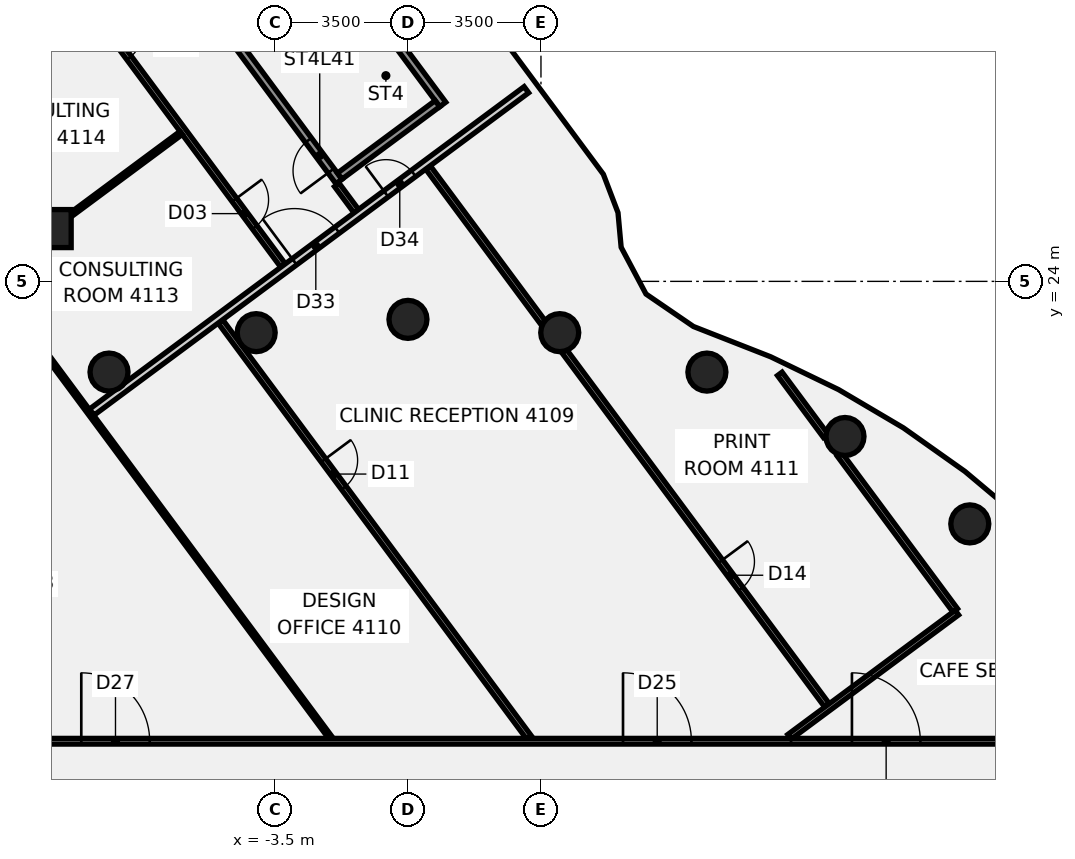
"""IFC4 building model, lengths in metres.
Left out: names, types, materials, properties, quantities, classifications, styles, units other than length and angle.
Written with IfcOpenShell. Run it as: python <this file> out.ifc"""

import sys

from ifc_helpers import new_model, si_unit, direction, frame, frame_2d, origin, origin_2d, place, context, subcontext, project, spatial, rectangle, circle, extrude, element, fill, save


model = new_model("IFC4")
c1 = context("Model", 3, precision=1e-05, world=origin(), true_north=direction((0.0, 1.0)))
c2 = subcontext(c1, "Body", "Model", "MODEL_VIEW")
j1 = project(units=[si_unit("LENGTHUNIT", "METRE"), si_unit("PLANEANGLEUNIT", "RADIAN")], contexts=[c1])
p1 = place(None, origin())
s1 = spatial("IfcSite", under=j1, at=p1, CompositionType="ELEMENT")
p2 = place(p1, origin())
s2 = spatial("IfcBuilding", under=s1, at=p2, CompositionType="ELEMENT")
p3 = place(p2, frame((0.0, 0.0, 166.75)))
s3 = spatial("IfcBuildingStorey", under=s2, at=p3, CompositionType="ELEMENT", Elevation=166.75)
for number, where, z_axis, x_axis in (
    (1, (14.784, 17.619, -0.14), (0.0, 0.0, 1.0), (1.0, 0.0, 0.0)),
    (2, (11.5, 19.919, -0.14), (0.0, 0.0, 1.0), (1.0, 0.0, 0.0)),
    (3, (7.866, 21.613, -0.14), (0.0, 0.0, 1.0), (1.0, 0.0, 0.0)),
    (4, (3.994, 22.651, -0.14), (0.0, 0.0, 1.0), (1.0, 0.0, 0.0)),
    (5, (0.0, 23.0, -0.14), (0.0, 0.0, 1.0), (1.0, 0.0, 0.0)),
    (6, (-3.994, 22.651, -0.14), (0.0, 0.0, 1.0), (1.0, 0.0, 0.0)),
    (7, (-7.866, 21.613, -0.14), (0.0, 0.0, 1.0), (1.0, 0.0, 0.0)),
):
    element("IfcColumn", number, at=place(p3, frame(where, z_axis=z_axis, x_axis=x_axis)), inside=s3, PredefinedType="COLUMN", context=c2, shape_type="SweptSolid", body=[
        extrude(circle(Radius=0.5, at=origin_2d()), origin(), (0.0, 0.0, 1.0), 3.75),
    ])
p4 = place(p3, frame((-9.362, 25.389, -0.139), z_axis=(-0.016073420315, -0.045617277899, 0.998829669722), x_axis=(0.803150042822, 0.594427631034, 0.040072436636)))
e8 = element("IfcColumn", 8, at=p4, inside=s3, PredefinedType="COLUMN", context=c2, shape_type="SweptSolid", body=[
    extrude(rectangle(XDim=1.0, YDim=1.0, at=origin_2d()), origin(), (0.0, 0.0, 1.0), 3.752),
])
p5 = place(p3, frame((-13.904, 38.73, 0.0), z_axis=(0.0, 0.0, 1.0), x_axis=(0.59579618611, -0.803135670119, 0.0)))
e9 = element("IfcWall", 9, at=p5, inside=s3, PredefinedType="PARTITIONING", context=c2, shape_type="SweptSolid", body=[
    extrude(rectangle(XDim=17.82, YDim=0.15, at=frame_2d((8.91, 0.0))), origin(), (0.0, 0.0, 1.0), 3.01),
])
p6 = place(p5, frame((15.67, 0.0, 0.0)))
e10 = element("IfcOpeningElement", 10, at=p6, cuts=e9, PredefinedType="OPENING", context=c2, shape_type="SweptSolid", body=[
    extrude(rectangle(XDim=0.9, YDim=2.1, at=frame_2d((0.45, 1.05))), frame((0.0, 0.085, 0.0), z_axis=(0.0, -1.0, 0.0), x_axis=(1.0, 0.0, 0.0)), (0.0, 0.0, 1.0), 0.17),
])
p7 = place(p5, frame((10.121, 0.0, 0.0)))
e11 = element("IfcOpeningElement", 11, at=p7, cuts=e9, PredefinedType="OPENING", context=c2, shape_type="SweptSolid", body=[
    extrude(rectangle(XDim=0.9, YDim=2.1, at=frame_2d((0.45, 1.05))), frame((0.0, 0.085, 0.0), z_axis=(0.0, -1.0, 0.0), x_axis=(1.0, 0.0, 0.0)), (0.0, 0.0, 1.0), 0.17),
])
p8 = place(p5, frame((6.82, 0.0, 0.0)))
e12 = element("IfcOpeningElement", 12, at=p8, cuts=e9, PredefinedType="OPENING", context=c2, shape_type="SweptSolid", body=[
    extrude(rectangle(XDim=0.9, YDim=2.1, at=frame_2d((0.45, 1.05))), frame((0.0, 0.085, 0.0), z_axis=(0.0, -1.0, 0.0), x_axis=(1.0, 0.0, 0.0)), (0.0, 0.0, 1.0), 0.17),
])
p9 = place(p5, frame((2.32, 0.0, 0.0)))
e13 = element("IfcOpeningElement", 13, at=p9, cuts=e9, PredefinedType="OPENING", context=c2, shape_type="SweptSolid", body=[
    extrude(rectangle(XDim=0.9, YDim=2.1, at=frame_2d((0.45, 1.05))), frame((0.0, 0.085, 0.0), z_axis=(0.0, -1.0, 0.0), x_axis=(1.0, 0.0, 0.0)), (0.0, 0.0, 1.0), 0.17),
])
p10 = place(p3, frame((-1.872, 26.538, 0.0), z_axis=(0.0, 0.0, 1.0), x_axis=(0.595675602575, -0.803225109478, 0.0)))
e14 = element("IfcWall", 14, at=p10, inside=s3, PredefinedType="PARTITIONING", context=c2, shape_type="SweptSolid", body=[
    extrude(rectangle(XDim=0.86, YDim=0.15, at=frame_2d((0.43, 0.0))), origin(), (0.0, 0.0, 1.0), 3.01),
])
p11 = place(p3, frame((-10.28, 23.102, 0.0), z_axis=(0.0, 0.0, 1.0), x_axis=(0.595748539786, -0.803171013759, 0.0)))
e15 = element("IfcWall", 15, at=p11, inside=s3, PredefinedType="PARTITIONING", context=c2, shape_type="SweptSolid", body=[
    extrude(rectangle(XDim=13.837, YDim=0.1, at=frame_2d((6.918, 0.0))), origin(), (0.0, 0.0, 1.0), 3.01),
])
p12 = place(p3, frame((-4.935, 22.946, 0.0), z_axis=(0.0, 0.0, 1.0), x_axis=(0.595807043393, -0.803127615665, 0.0)))
e16 = element("IfcWall", 16, at=p12, inside=s3, PredefinedType="PARTITIONING", context=c2, shape_type="SweptSolid", body=[
    extrude(rectangle(XDim=13.628, YDim=0.15, at=frame_2d((6.814, 0.0))), origin(), (0.0, 0.0, 1.0), 3.01),
])
p13 = place(p12, frame((4.55, 0.0, 0.0)))
e17 = element("IfcOpeningElement", 17, at=p13, cuts=e16, PredefinedType="OPENING", context=c2, shape_type="SweptSolid", body=[
    extrude(rectangle(XDim=0.9, YDim=2.1, at=frame_2d((0.45, 1.05))), frame((0.0, 0.085, 0.0), z_axis=(0.0, -1.0, 0.0), x_axis=(1.0, 0.0, 0.0)), (0.0, 0.0, 1.0), 0.17),
])
p14 = place(p3, frame((0.527, 26.998, 0.0), z_axis=(0.0, 0.0, 1.0), x_axis=(0.595769052074, -0.803155798455, 0.0)))
e18 = element("IfcWall", 18, at=p14, inside=s3, PredefinedType="PARTITIONING", context=c2, shape_type="SweptSolid", body=[
    extrude(rectangle(XDim=5.088, YDim=0.15, at=frame_2d((2.544, 0.0))), origin(), (0.0, 0.0, 1.0), 3.01),
])
p15 = place(p3, frame((4.107, 22.171, 0.0), z_axis=(0.0, 0.0, 1.0), x_axis=(0.59578611064, -0.803143144382, 0.0)))
e19 = element("IfcWall", 19, at=p15, inside=s3, PredefinedType="PARTITIONING", context=c2, shape_type="SweptSolid", body=[
    extrude(rectangle(XDim=11.61, YDim=0.15, at=frame_2d((5.805, 0.0))), origin(), (0.0, 0.0, 1.0), 3.01),
])
p16 = place(p15, frame((6.9, 0.0, 0.0)))
e20 = element("IfcOpeningElement", 20, at=p16, cuts=e19, PredefinedType="OPENING", context=c2, shape_type="SweptSolid", body=[
    extrude(rectangle(XDim=0.9, YDim=2.1, at=frame_2d((0.45, 1.05))), frame((0.0, 0.085, 0.0), z_axis=(0.0, -1.0, 0.0), x_axis=(1.0, 0.0, 0.0)), (0.0, 0.0, 1.0), 0.17),
])
p17 = place(p3, frame((9.784, 21.566, 0.0), z_axis=(0.0, 0.0, 1.0), x_axis=(0.595779392593, -0.803148127908, 0.0)))
e21 = element("IfcWall", 21, at=p17, inside=s3, PredefinedType="PARTITIONING", context=c2, shape_type="SweptSolid", body=[
    extrude(rectangle(XDim=2.031, YDim=0.15, at=frame_2d((1.016, 0.0))), origin(), (0.0, 0.0, 1.0), 3.01),
])
p18 = place(p3, frame((11.357, 19.447, 0.0), z_axis=(0.0, 0.0, 1.0), x_axis=(0.595809139837, -0.803126060396, 0.0)))
e22 = element("IfcWall", 22, at=p18, inside=s3, PredefinedType="PARTITIONING", context=c2, shape_type="SweptSolid", body=[
    extrude(rectangle(XDim=5.108, YDim=0.15, at=frame_2d((2.554, 0.0))), origin(), (0.0, 0.0, 1.0), 3.01),
])
p19 = place(p3, frame((-17.065, 11.9, 0.0), z_axis=(0.0, 0.0, 1.0), x_axis=(1.0, 0.0, 0.0)))
e23 = element("IfcWall", 23, at=p19, inside=s3, PredefinedType="PARTITIONING", context=c2, shape_type="SweptSolid", body=[
    extrude(rectangle(XDim=34.165, YDim=0.15, at=frame_2d((17.083, 0.0))), origin(), (0.0, 0.0, 1.0), 3.01),
])
p20 = place(p19, frame((22.724, 0.0, 0.0)))
e24 = element("IfcOpeningElement", 24, at=p20, cuts=e23, PredefinedType="OPENING", context=c2, shape_type="SweptSolid", body=[
    extrude(rectangle(XDim=1.8, YDim=2.1, at=frame_2d((0.9, 1.05))), frame((0.0, 0.085, 0.0), z_axis=(0.0, -1.0, 0.0), x_axis=(1.0, 0.0, 0.0)), (0.0, 0.0, 1.0), 0.17),
])
p21 = place(p19, frame((28.748, 0.0, 0.0)))
e25 = element("IfcOpeningElement", 25, at=p21, cuts=e23, PredefinedType="OPENING", context=c2, shape_type="SweptSolid", body=[
    extrude(rectangle(XDim=1.8, YDim=2.1, at=frame_2d((0.9, 1.05))), frame((0.0, 0.085, 0.0), z_axis=(0.0, -1.0, 0.0), x_axis=(1.0, 0.0, 0.0)), (0.0, 0.0, 1.0), 0.17),
])
p22 = place(p19, frame((8.469, 0.0, 0.0)))
e26 = element("IfcOpeningElement", 26, at=p22, cuts=e23, PredefinedType="OPENING", context=c2, shape_type="SweptSolid", body=[
    extrude(rectangle(XDim=1.8, YDim=2.1, at=frame_2d((0.9, 1.05))), frame((0.0, 0.085, 0.0), z_axis=(0.0, -1.0, 0.0), x_axis=(1.0, 0.0, 0.0)), (0.0, 0.0, 1.0), 0.17),
])
p23 = place(p3, frame((-13.029, 28.271, 0.0), z_axis=(0.0, 0.0, 1.0), x_axis=(0.803121526748, 0.595815250958, 0.0)))
e27 = element("IfcWall", 27, at=p23, inside=s3, PredefinedType="PARTITIONING", context=c2, shape_type="SweptSolid", body=[
    extrude(rectangle(XDim=5.453, YDim=0.1, at=frame_2d((2.726, 0.0))), origin(), (0.0, 0.0, 1.0), 3.01),
])
p24 = place(p3, frame((-8.95, 25.695, 0.0), z_axis=(0.0, 0.0, 1.0), x_axis=(0.803185337767, 0.595729228086, 0.0)))
e28 = element("IfcWall", 28, at=p24, inside=s3, PredefinedType="PARTITIONING", context=c2, shape_type="SweptSolid", body=[
    extrude(rectangle(XDim=3.712, YDim=0.1, at=frame_2d((1.856, 0.0))), origin(), (0.0, 0.0, 1.0), 3.01),
])
p25 = place(p3, frame((-8.32, 20.56, 0.0), z_axis=(0.0, 0.0, 1.0), x_axis=(0.803159426549, 0.595764161012, 0.0)))
e29 = element("IfcWall", 29, at=p25, inside=s3, PredefinedType="PARTITIONING", context=c2, shape_type="SweptSolid", body=[
    extrude(rectangle(XDim=14.239, YDim=0.2, at=frame_2d((7.12, 0.0))), origin(), (0.0, 0.0, 1.0), 3.01),
])
p26 = place(p25, frame((6.64, 0.0, 0.0)))
e30 = element("IfcOpeningElement", 30, at=p26, cuts=e29, PredefinedType="OPENING", context=c2, shape_type="SweptSolid", body=[
    extrude(rectangle(XDim=1.4, YDim=2.1, at=frame_2d((0.7, 1.05))), frame((0.0, 0.11, 0.0), z_axis=(0.0, -1.0, 0.0), x_axis=(1.0, 0.0, 0.0)), (0.0, 0.0, 1.0), 0.22),
])
p27 = place(p25, frame((9.64, 0.0, 0.0)))
e31 = element("IfcOpeningElement", 31, at=p27, cuts=e29, PredefinedType="OPENING", context=c2, shape_type="SweptSolid", body=[
    extrude(rectangle(XDim=0.9, YDim=2.1, at=frame_2d((0.45, 1.05))), frame((0.0, 0.11, 0.0), z_axis=(0.0, -1.0, 0.0), x_axis=(1.0, 0.0, 0.0)), (0.0, 0.0, 1.0), 0.22),
])
p28 = place(p3, frame((10.04, 12.016, 0.0), z_axis=(0.0, 0.0, 1.0), x_axis=(0.803166728219, 0.595754317385, 0.0)))
e32 = element("IfcWall", 32, at=p28, inside=s3, PredefinedType="PARTITIONING", context=c2, shape_type="SweptSolid", body=[
    extrude(rectangle(XDim=5.485, YDim=0.15, at=frame_2d((2.743, 0.0))), origin(), (0.0, 0.0, 1.0), 3.01),
])
p29 = place(p3, frame((-1.816, 26.63, -0.14), z_axis=(0.0, 0.0, 1.0), x_axis=(-0.595776416227, 0.803150335783, 0.0)))
e33 = element("IfcWall", 33, at=p29, inside=s3, PredefinedType="SHEAR", context=c2, shape_type="SweptSolid", body=[
    extrude(rectangle(XDim=6.7, YDim=0.2, at=frame_2d((3.35, 0.0))), origin(), (0.0, 0.0, 1.0), 3.15),
])
p30 = place(p29, frame((0.35, 0.0, 0.0)))
e34 = element("IfcOpeningElement", 34, at=p30, cuts=e33, PredefinedType="OPENING", context=c2, shape_type="SweptSolid", body=[
    extrude(rectangle(XDim=1.0, YDim=2.1, at=frame_2d((0.5, 1.05))), frame((0.0, 0.11, 0.0), z_axis=(0.0, -1.0, 0.0), x_axis=(1.0, 0.0, 0.0)), (0.0, 0.0, 1.0), 0.22),
])
p31 = place(p3, frame((0.915, 28.655, -0.14), z_axis=(0.0, 0.0, 1.0), x_axis=(-0.595776416227, 0.803150335783, 0.0)))
e35 = element("IfcWall", 35, at=p31, inside=s3, PredefinedType="SHEAR", context=c2, shape_type="SweptSolid", body=[
    extrude(rectangle(XDim=6.7, YDim=0.2, at=frame_2d((3.35, 0.0))), origin(), (0.0, 0.0, 1.0), 3.15),
])
p32 = place(p3, frame((0.775, 28.676, -0.14), z_axis=(0.0, 0.0, 1.0), x_axis=(-0.80314748859, -0.595780254432, 0.0)))
e36 = element("IfcWall", 36, at=p32, inside=s3, PredefinedType="SHEAR", context=c2, shape_type="SweptSolid", body=[
    extrude(rectangle(XDim=3.2, YDim=0.2, at=frame_2d((1.6, 0.0))), origin(), (0.0, 0.0, 1.0), 3.15),
])
p33 = place(p6, frame((0.9, 0.0, 0.0), z_axis=(0.0, 0.0, 1.0), x_axis=(-1.0, 0.0, 0.0)))
e37 = element("IfcDoor", 37, at=p33, inside=s3, OperationType="SINGLE_SWING_RIGHT", PredefinedType="DOOR", context=c2, shape_type="SweptSolid", body=[
    extrude(rectangle(XDim=0.9, YDim=2.1, at=frame_2d((0.45, 1.05))), frame((0.0, 0.025, 0.0), z_axis=(0.0, -1.0, 0.0), x_axis=(1.0, 0.0, 0.0)), (0.0, 0.0, 1.0), 0.05),
])
fill(e10, e37)
p34 = place(p7, frame((0.9, 0.0, 0.0), z_axis=(0.0, 0.0, 1.0), x_axis=(-1.0, 0.0, 0.0)))
e38 = element("IfcDoor", 38, at=p34, inside=s3, OperationType="SINGLE_SWING_RIGHT", PredefinedType="DOOR", context=c2, shape_type="SweptSolid", body=[
    extrude(rectangle(XDim=0.9, YDim=2.1, at=frame_2d((0.45, 1.05))), frame((0.0, 0.025, 0.0), z_axis=(0.0, -1.0, 0.0), x_axis=(1.0, 0.0, 0.0)), (0.0, 0.0, 1.0), 0.05),
])
fill(e11, e38)
p35 = place(p13, frame((0.9, 0.0, 0.0), z_axis=(0.0, 0.0, 1.0), x_axis=(-1.0, 0.0, 0.0)))
e39 = element("IfcDoor", 39, at=p35, inside=s3, OperationType="SINGLE_SWING_LEFT", PredefinedType="DOOR", context=c2, shape_type="SweptSolid", body=[
    extrude(rectangle(XDim=0.9, YDim=2.1, at=frame_2d((0.45, 1.05))), frame((0.0, 0.025, 0.0), z_axis=(0.0, -1.0, 0.0), x_axis=(1.0, 0.0, 0.0)), (0.0, 0.0, 1.0), 0.05),
])
fill(e17, e39)
p36 = place(p16, origin())
e40 = element("IfcDoor", 40, at=p36, inside=s3, OperationType="SINGLE_SWING_LEFT", PredefinedType="DOOR", context=c2, shape_type="SweptSolid", body=[
    extrude(rectangle(XDim=0.9, YDim=2.1, at=frame_2d((0.45, 1.05))), frame((0.0, 0.025, 0.0), z_axis=(0.0, -1.0, 0.0), x_axis=(1.0, 0.0, 0.0)), (0.0, 0.0, 1.0), 0.05),
])
fill(e20, e40)
p37 = place(p20, frame((1.8, 0.0, 0.0), z_axis=(0.0, 0.0, 1.0), x_axis=(-1.0, 0.0, 0.0)))
e41 = element("IfcDoor", 41, at=p37, inside=s3, OperationType="DOUBLE_DOOR_SINGLE_SWING", PredefinedType="DOOR", context=c2, shape_type="SweptSolid", body=[
    extrude(rectangle(XDim=1.8, YDim=2.1, at=frame_2d((0.9, 1.05))), frame((0.0, 0.025, 0.0), z_axis=(0.0, -1.0, 0.0), x_axis=(1.0, 0.0, 0.0)), (0.0, 0.0, 1.0), 0.05),
])
fill(e24, e41)
p38 = place(p21, origin())
e42 = element("IfcDoor", 42, at=p38, inside=s3, OperationType="DOUBLE_DOOR_SINGLE_SWING", PredefinedType="DOOR", context=c2, shape_type="SweptSolid", body=[
    extrude(rectangle(XDim=1.8, YDim=2.1, at=frame_2d((0.9, 1.05))), frame((0.0, 0.025, 0.0), z_axis=(0.0, -1.0, 0.0), x_axis=(1.0, 0.0, 0.0)), (0.0, 0.0, 1.0), 0.05),
])
fill(e25, e42)
p39 = place(p22, origin())
e43 = element("IfcDoor", 43, at=p39, inside=s3, OperationType="DOUBLE_DOOR_SINGLE_SWING", PredefinedType="DOOR", context=c2, shape_type="SweptSolid", body=[
    extrude(rectangle(XDim=1.8, YDim=2.1, at=frame_2d((0.9, 1.05))), frame((0.0, 0.025, 0.0), z_axis=(0.0, -1.0, 0.0), x_axis=(1.0, 0.0, 0.0)), (0.0, 0.0, 1.0), 0.05),
])
fill(e26, e43)
p40 = place(p26, frame((1.4, 0.0, 0.0), z_axis=(0.0, 0.0, 1.0), x_axis=(-1.0, 0.0, 0.0)))
e44 = element("IfcDoor", 44, at=p40, inside=s3, OperationType="DOUBLE_DOOR_SINGLE_SWING", PredefinedType="DOOR", context=c2, shape_type="SweptSolid", body=[
    extrude(rectangle(XDim=1.4, YDim=2.1, at=frame_2d((0.7, 1.05))), frame((0.0, 0.025, 0.0), z_axis=(0.0, -1.0, 0.0), x_axis=(1.0, 0.0, 0.0)), (0.0, 0.0, 1.0), 0.05),
])
fill(e30, e44)
p41 = place(p27, origin())
e45 = element("IfcDoor", 45, at=p41, inside=s3, OperationType="SINGLE_SWING_LEFT", PredefinedType="DOOR", context=c2, shape_type="SweptSolid", body=[
    extrude(rectangle(XDim=0.9, YDim=2.1, at=frame_2d((0.45, 1.05))), frame((0.0, 0.025, 0.0), z_axis=(0.0, -1.0, 0.0), x_axis=(1.0, 0.0, 0.0)), (0.0, 0.0, 1.0), 0.05),
])
fill(e31, e45)
p42 = place(p30, origin())
e46 = element("IfcDoor", 46, at=p42, inside=s3, OperationType="SINGLE_SWING_LEFT", PredefinedType="DOOR", context=c2, shape_type="SweptSolid", body=[
    extrude(rectangle(XDim=1.0, YDim=2.1, at=frame_2d((0.5, 1.05))), frame((0.0, 0.025, 0.0), z_axis=(0.0, -1.0, 0.0), x_axis=(1.0, 0.0, 0.0)), (0.0, 0.0, 1.0), 0.05),
])
fill(e34, e46)
save(model, sys.argv[1])
